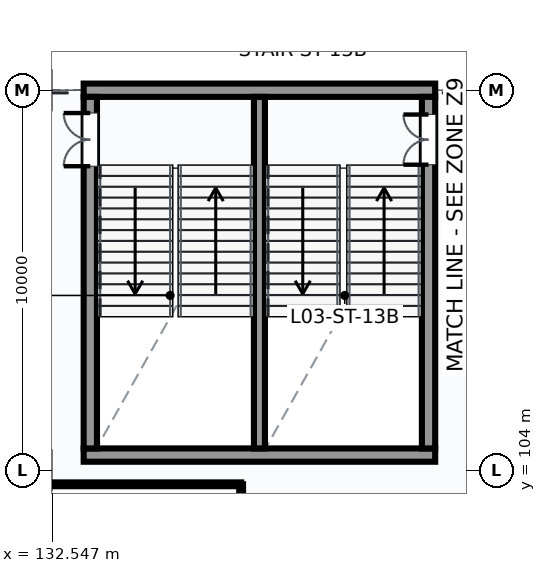
"""IFC4 building model, lengths in metres.
Left out: names, types, materials, properties, quantities, classifications, styles, units other than length and angle.
Written with IfcOpenShell. Run it as: python <this file> out.ifc"""

import sys

from ifc_helpers import new_model, si_unit, direction, frame, frame_2d, origin, place, context, subcontext, project, spatial, rectangle, extrude, element, fill, save


model = new_model("IFC4")
c1 = context("Model", 3, precision=1e-05, world=origin(), true_north=direction((0.0, 1.0)))
c2 = subcontext(c1, "Body", "Model", "MODEL_VIEW")
j1 = project(units=[si_unit("LENGTHUNIT", "METRE"), si_unit("PLANEANGLEUNIT", "RADIAN")], contexts=[c1])
p1 = place(None, origin())
s1 = spatial("IfcSite", under=j1, at=p1, CompositionType="ELEMENT")
p2 = place(p1, origin())
s2 = spatial("IfcBuilding", under=s1, at=p2, CompositionType="ELEMENT")
p3 = place(p2, frame((0.0, 0.0, 14.7)))
s3 = spatial("IfcBuildingStorey", under=s2, at=p3, CompositionType="ELEMENT", Elevation=14.7)
p4 = place(p3, frame((133.375, 104.4, 0.0), z_axis=(0.0, 0.0, 1.0), x_axis=(1.0, 0.0, 0.0)))
e1 = element("IfcWall", 1, at=p4, inside=s3, PredefinedType="SHEAR", context=c2, shape_type="SweptSolid", body=[
    extrude(rectangle(XDim=9.25, YDim=0.35, at=frame_2d((4.625, 0.0))), origin(), (0.0, 0.0, 1.0), 4.5),
])
p5 = place(p3, frame((133.375, 114.0, 0.0), z_axis=(0.0, 0.0, 1.0), x_axis=(1.0, 0.0, 0.0)))
e2 = element("IfcWall", 2, at=p5, inside=s3, PredefinedType="SHEAR", context=c2, shape_type="SweptSolid", body=[
    extrude(rectangle(XDim=9.25, YDim=0.35, at=frame_2d((4.625, 0.0))), origin(), (0.0, 0.0, 1.0), 3.596),
])
p6 = place(p3, frame((133.55, 104.575, 0.0), z_axis=(0.0, 0.0, 1.0), x_axis=(0.0, 1.0, 0.0)))
e3 = element("IfcWall", 3, at=p6, inside=s3, PredefinedType="SHEAR", context=c2, shape_type="SweptSolid", body=[
    extrude(rectangle(XDim=9.25, YDim=0.35, at=frame_2d((4.625, 0.0))), origin(), (0.0, 0.0, 1.0), 4.5),
])
p7 = place(p6, frame((7.425, 0.0, 0.0)))
e4 = element("IfcOpeningElement", 4, at=p7, cuts=e3, PredefinedType="OPENING", context=c2, shape_type="SweptSolid", body=[
    extrude(rectangle(XDim=1.4, YDim=2.2, at=frame_2d((0.7, 1.1))), frame((0.0, 0.185, 0.0), z_axis=(0.0, -1.0, 0.0), x_axis=(1.0, 0.0, 0.0)), (0.0, 0.0, 1.0), 0.37),
])
p8 = place(p3, frame((142.45, 104.575, 0.0), z_axis=(0.0, 0.0, 1.0), x_axis=(0.0, 1.0, 0.0)))
e5 = element("IfcWall", 5, at=p8, inside=s3, PredefinedType="SHEAR", context=c2, shape_type="SweptSolid", body=[
    extrude(rectangle(XDim=9.25, YDim=0.35, at=frame_2d((4.625, 0.0))), origin(), (0.0, 0.0, 1.0), 4.5),
])
p9 = place(p8, frame((7.465, 0.0, 0.0)))
e6 = element("IfcOpeningElement", 6, at=p9, cuts=e5, PredefinedType="OPENING", context=c2, shape_type="SweptSolid", body=[
    extrude(rectangle(XDim=1.32, YDim=2.2, at=frame_2d((0.66, 1.1))), frame((0.0, 0.185, 0.0), z_axis=(0.0, -1.0, 0.0), x_axis=(1.0, 0.0, 0.0)), (0.0, 0.0, 1.0), 0.37),
])
p10 = place(p3, frame((138.0, 104.575, 0.0), z_axis=(0.0, 0.0, 1.0), x_axis=(0.0, 1.0, 0.0)))
e7 = element("IfcWall", 7, at=p10, inside=s3, PredefinedType="SHEAR", context=c2, shape_type="SweptSolid", body=[
    extrude(rectangle(XDim=9.25, YDim=0.29, at=frame_2d((4.625, 0.0))), origin(), (0.0, 0.0, 1.0), 4.5),
])
p11 = place(p3, frame((137.519, 103.631, 0.0), z_axis=(0.0, 0.0, 1.0), x_axis=(0.0, -1.0, 0.0)))
e8 = element("IfcWall", 8, at=p11, inside=s3, PredefinedType="PARTITIONING", context=c2, shape_type="SweptSolid", body=[
    extrude(rectangle(XDim=7.288, YDim=0.1, at=frame_2d((3.644, 0.0))), origin(), (0.0, 0.0, 1.0), 4.16),
])
p12 = place(p11, frame((2.269, 0.0, 0.0)))
e9 = element("IfcOpeningElement", 9, at=p12, cuts=e8, PredefinedType="OPENING", context=c2, shape_type="SweptSolid", body=[
    extrude(rectangle(XDim=1.0, YDim=2.2, at=frame_2d((0.5, 1.1))), frame((0.0, 0.06, 0.0), z_axis=(0.0, -1.0, 0.0), x_axis=(1.0, 0.0, 0.0)), (0.0, 0.0, 1.0), 0.12),
])
p13 = place(p3, frame((127.119, 103.631, 0.0), z_axis=(0.0, 0.0, 1.0), x_axis=(1.0, 0.0, 0.0)))
e10 = element("IfcWall", 10, at=p13, inside=s3, PredefinedType="PARTITIONING", context=c2, shape_type="SweptSolid", body=[
    extrude(rectangle(XDim=10.4, YDim=0.1, at=frame_2d((5.2, 0.0))), origin(), (0.0, 0.0, 1.0), 2.603),
])
p14 = place(p7, frame((1.4, 0.0, 0.0), z_axis=(0.0, 0.0, 1.0), x_axis=(-1.0, 0.0, 0.0)))
e11 = element("IfcDoor", 11, at=p14, inside=s3, OperationType="DOUBLE_DOOR_SINGLE_SWING", PredefinedType="DOOR", context=c2, shape_type="SweptSolid", body=[
    extrude(rectangle(XDim=1.4, YDim=2.2, at=frame_2d((0.7, 1.1))), frame((0.0, 0.025, 0.0), z_axis=(0.0, -1.0, 0.0), x_axis=(1.0, 0.0, 0.0)), (0.0, 0.0, 1.0), 0.05),
])
fill(e4, e11)
p15 = place(p9, origin())
e12 = element("IfcDoor", 12, at=p15, inside=s3, OperationType="DOUBLE_DOOR_SINGLE_SWING", PredefinedType="DOOR", context=c2, shape_type="SweptSolid", body=[
    extrude(rectangle(XDim=1.32, YDim=2.2, at=frame_2d((0.66, 1.1))), frame((0.0, 0.025, 0.0), z_axis=(0.0, -1.0, 0.0), x_axis=(1.0, 0.0, 0.0)), (0.0, 0.0, 1.0), 0.05),
])
fill(e6, e12)
save(model, sys.argv[1])
